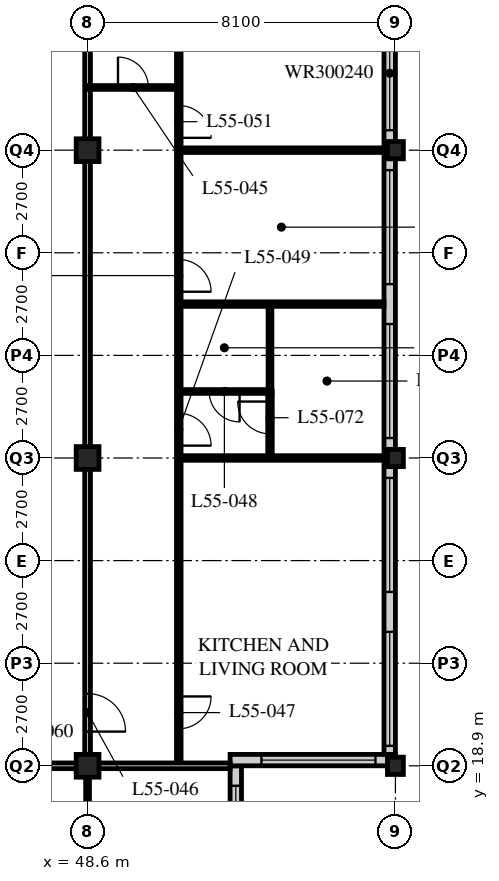
"""IFC4 building model, lengths in metres.
Left out: names, types, materials, properties, quantities, classifications, styles, units other than length and angle.
Written with IfcOpenShell. Run it as: python <this file> out.ifc"""

import sys

from ifc_helpers import new_model, si_unit, direction, frame, frame_2d, origin, origin_2d, place, context, subcontext, project, spatial, rectangle, hollow_rectangle, i_section, extrude, element, fill, save


model = new_model("IFC4")
c1 = context("Model", 3, precision=1e-05, world=origin(), true_north=direction((0.0, 1.0)))
c2 = subcontext(c1, "Body", "Model", "MODEL_VIEW")
j1 = project(units=[si_unit("LENGTHUNIT", "METRE"), si_unit("PLANEANGLEUNIT", "RADIAN")], contexts=[c1])
p1 = place(None, origin())
s1 = spatial("IfcSite", under=j1, at=p1, CompositionType="ELEMENT")
p2 = place(p1, origin())
s2 = spatial("IfcBuilding", under=s1, at=p2, CompositionType="ELEMENT")
p3 = place(p2, frame((0.0, 0.0, 213.6)))
s3 = spatial("IfcBuildingStorey", under=s2, at=p3, CompositionType="ELEMENT", Elevation=213.6)
for number, where, z_axis, x_axis in (
    (1, (48.6, 18.9, 0.0), (0.0, 0.0, 1.0), (1.0, 0.0, 0.0)),
    (2, (48.6, 27.0, 0.0), (0.0, 0.0, 1.0), (1.0, 0.0, 0.0)),
    (3, (48.6, 35.1, 0.0), (0.0, 0.0, 1.0), (1.0, 0.0, 0.0)),
):
    element("IfcColumn", number, at=place(p3, frame(where, z_axis=z_axis, x_axis=x_axis)), inside=s3, PredefinedType="COLUMN", context=c2, shape_type="SweptSolid", body=[
        extrude(hollow_rectangle(XDim=0.6, YDim=0.6, WallThickness=0.05, at=origin_2d()), origin(), (0.0, 0.0, 1.0), 3.6),
    ])
for number, where, z_axis, x_axis in (
    (4, (56.7, 18.9, 0.0), (0.0, 0.0, 1.0), (1.0, 0.0, 0.0)),
    (5, (56.7, 27.0, 0.0), (0.0, 0.0, 1.0), (1.0, 0.0, 0.0)),
    (6, (56.7, 35.1, 0.0), (0.0, 0.0, 1.0), (1.0, 0.0, 0.0)),
):
    element("IfcColumn", number, at=place(p3, frame(where, z_axis=z_axis, x_axis=x_axis)), inside=s3, PredefinedType="COLUMN", context=c2, shape_type="SweptSolid", body=[
        extrude(i_section(OverallWidth=0.418, OverallDepth=0.456, WebThickness=0.042, FlangeThickness=0.067, FilletRadius=0.015, at=origin_2d()), origin(), (0.0, 0.0, 1.0), 3.6),
    ])
p4 = place(p3, frame((52.5, 15.15, 0.0), z_axis=(0.0, 0.0, 1.0), x_axis=(0.0, 1.0, 0.0)))
e7 = element("IfcWall", 7, at=p4, inside=s3, PredefinedType="SOLIDWALL", context=c2, shape_type="SweptSolid", body=[
    extrude(rectangle(XDim=3.75, YDim=0.3, at=frame_2d((1.875, 0.0))), origin(), (0.0, 0.0, 1.0), 3.39),
])
p5 = place(p4, frame((0.225, 0.0, 0.6)))
e8 = element("IfcOpeningElement", 8, at=p5, cuts=e7, PredefinedType="OPENING", context=c2, shape_type="SweptSolid", body=[
    extrude(rectangle(XDim=3.0, YDim=2.0, at=frame_2d((1.5, 1.0))), frame((0.0, 0.16, 0.0), z_axis=(0.0, -1.0, 0.0), x_axis=(1.0, 0.0, 0.0)), (0.0, 0.0, 1.0), 0.32),
])
p6 = place(p3, frame((52.35, 19.05, 0.0), z_axis=(0.0, 0.0, 1.0), x_axis=(1.0, 0.0, 0.0)))
e9 = element("IfcWall", 9, at=p6, inside=s3, PredefinedType="SOLIDWALL", context=c2, shape_type="SweptSolid", body=[
    extrude(rectangle(XDim=4.35, YDim=0.3, at=frame_2d((2.175, 0.0))), origin(), (0.0, 0.0, 1.0), 3.39),
])
p7 = place(p6, frame((0.825, 0.0, 0.6)))
e10 = element("IfcOpeningElement", 10, at=p7, cuts=e9, PredefinedType="OPENING", context=c2, shape_type="SweptSolid", body=[
    extrude(rectangle(XDim=3.0, YDim=2.0, at=frame_2d((1.5, 1.0))), frame((0.0, 0.16, 0.0), z_axis=(0.0, -1.0, 0.0), x_axis=(1.0, 0.0, 0.0)), (0.0, 0.0, 1.0), 0.32),
])
p8 = place(p3, frame((56.55, 19.2, 0.0), z_axis=(0.0, 0.0, 1.0), x_axis=(0.0, 1.0, 0.0)))
e11 = element("IfcWall", 11, at=p8, inside=s3, PredefinedType="SOLIDWALL", context=c2, shape_type="SweptSolid", body=[
    extrude(rectangle(XDim=32.1, YDim=0.3, at=frame_2d((16.05, 0.0))), origin(), (0.0, 0.0, 1.0), 3.39),
])
p9 = place(p8, frame((0.225, 0.0, 0.6)))
e12 = element("IfcOpeningElement", 12, at=p9, cuts=e11, PredefinedType="OPENING", context=c2, shape_type="SweptSolid", body=[
    extrude(rectangle(XDim=3.0, YDim=2.4, at=frame_2d((1.5, 1.2))), frame((0.0, 0.16, 0.0), z_axis=(0.0, -1.0, 0.0), x_axis=(1.0, 0.0, 0.0)), (0.0, 0.0, 1.0), 0.32),
])
p10 = place(p8, frame((4.275, 0.0, 0.6)))
e13 = element("IfcOpeningElement", 13, at=p10, cuts=e11, PredefinedType="OPENING", context=c2, shape_type="SweptSolid", body=[
    extrude(rectangle(XDim=3.0, YDim=2.4, at=frame_2d((1.5, 1.2))), frame((0.0, 0.16, 0.0), z_axis=(0.0, -1.0, 0.0), x_axis=(1.0, 0.0, 0.0)), (0.0, 0.0, 1.0), 0.32),
])
p11 = place(p8, frame((8.325, 0.0, 0.6)))
e14 = element("IfcOpeningElement", 14, at=p11, cuts=e11, PredefinedType="OPENING", context=c2, shape_type="SweptSolid", body=[
    extrude(rectangle(XDim=3.0, YDim=2.4, at=frame_2d((1.5, 1.2))), frame((0.0, 0.16, 0.0), z_axis=(0.0, -1.0, 0.0), x_axis=(1.0, 0.0, 0.0)), (0.0, 0.0, 1.0), 0.32),
])
p12 = place(p8, frame((12.375, 0.0, 0.6)))
e15 = element("IfcOpeningElement", 15, at=p12, cuts=e11, PredefinedType="OPENING", context=c2, shape_type="SweptSolid", body=[
    extrude(rectangle(XDim=3.0, YDim=2.4, at=frame_2d((1.5, 1.2))), frame((0.0, 0.16, 0.0), z_axis=(0.0, -1.0, 0.0), x_axis=(1.0, 0.0, 0.0)), (0.0, 0.0, 1.0), 0.32),
])
p13 = place(p8, frame((16.425, 0.0, 0.6)))
e16 = element("IfcOpeningElement", 16, at=p13, cuts=e11, PredefinedType="OPENING", context=c2, shape_type="SweptSolid", body=[
    extrude(rectangle(XDim=3.0, YDim=2.4, at=frame_2d((1.5, 1.2))), frame((0.0, 0.16, 0.0), z_axis=(0.0, -1.0, 0.0), x_axis=(1.0, 0.0, 0.0)), (0.0, 0.0, 1.0), 0.32),
])
p14 = place(p8, frame((20.475, 0.0, 0.6)))
e17 = element("IfcOpeningElement", 17, at=p14, cuts=e11, PredefinedType="OPENING", context=c2, shape_type="SweptSolid", body=[
    extrude(rectangle(XDim=3.0, YDim=2.4, at=frame_2d((1.5, 1.2))), frame((0.0, 0.16, 0.0), z_axis=(0.0, -1.0, 0.0), x_axis=(1.0, 0.0, 0.0)), (0.0, 0.0, 1.0), 0.32),
])
p15 = place(p8, frame((24.525, 0.0, 0.6)))
e18 = element("IfcOpeningElement", 18, at=p15, cuts=e11, PredefinedType="OPENING", context=c2, shape_type="SweptSolid", body=[
    extrude(rectangle(XDim=3.0, YDim=2.4, at=frame_2d((1.5, 1.2))), frame((0.0, 0.16, 0.0), z_axis=(0.0, -1.0, 0.0), x_axis=(1.0, 0.0, 0.0)), (0.0, 0.0, 1.0), 0.32),
])
p16 = place(p8, frame((28.575, 0.0, 0.6)))
e19 = element("IfcOpeningElement", 19, at=p16, cuts=e11, PredefinedType="OPENING", context=c2, shape_type="SweptSolid", body=[
    extrude(rectangle(XDim=3.0, YDim=2.4, at=frame_2d((1.5, 1.2))), frame((0.0, 0.16, 0.0), z_axis=(0.0, -1.0, 0.0), x_axis=(1.0, 0.0, 0.0)), (0.0, 0.0, 1.0), 0.32),
])
p17 = place(p3, frame((12.15, 18.9, 0.0), z_axis=(0.0, 0.0, 1.0), x_axis=(1.0, 0.0, 0.0)))
e20 = element("IfcWall", 20, at=p17, inside=s3, PredefinedType="PARTITIONING", context=c2, shape_type="SweptSolid", body=[
    extrude(rectangle(XDim=36.45, YDim=0.15, at=frame_2d((18.225, 0.0))), origin(), (0.0, 0.0, 1.0), 2.778),
])
p18 = place(p17, frame((4.95, 0.0, 0.0)))
e21 = element("IfcOpeningElement", 21, at=p18, cuts=e20, PredefinedType="OPENING", context=c2, shape_type="SweptSolid", body=[
    extrude(rectangle(XDim=1.0, YDim=2.1, at=frame_2d((0.5, 1.05))), frame((0.0, 0.085, 0.0), z_axis=(0.0, -1.0, 0.0), x_axis=(1.0, 0.0, 0.0)), (0.0, 0.0, 1.0), 0.17),
])
p19 = place(p17, frame((22.6, 0.0, 0.0)))
e22 = element("IfcOpeningElement", 22, at=p19, cuts=e20, PredefinedType="OPENING", context=c2, shape_type="SweptSolid", body=[
    extrude(rectangle(XDim=1.0, YDim=2.1, at=frame_2d((0.5, 1.05))), frame((0.0, 0.085, 0.0), z_axis=(0.0, -1.0, 0.0), x_axis=(1.0, 0.0, 0.0)), (0.0, 0.0, 1.0), 0.17),
])
p20 = place(p17, frame((25.0, 0.0, 0.0)))
e23 = element("IfcOpeningElement", 23, at=p20, cuts=e20, PredefinedType="OPENING", context=c2, shape_type="SweptSolid", body=[
    extrude(rectangle(XDim=1.0, YDim=2.1, at=frame_2d((0.5, 1.05))), frame((0.0, 0.085, 0.0), z_axis=(0.0, -1.0, 0.0), x_axis=(1.0, 0.0, 0.0)), (0.0, 0.0, 1.0), 0.17),
])
p21 = place(p17, frame((30.7, 0.0, 0.0)))
e24 = element("IfcOpeningElement", 24, at=p21, cuts=e20, PredefinedType="OPENING", context=c2, shape_type="SweptSolid", body=[
    extrude(rectangle(XDim=1.0, YDim=2.1, at=frame_2d((0.5, 1.05))), frame((0.0, 0.085, 0.0), z_axis=(0.0, -1.0, 0.0), x_axis=(1.0, 0.0, 0.0)), (0.0, 0.0, 1.0), 0.17),
])
p22 = place(p17, frame((1.525, 0.0, 0.0)))
e25 = element("IfcOpeningElement", 25, at=p22, cuts=e20, PredefinedType="OPENING", context=c2, shape_type="SweptSolid", body=[
    extrude(rectangle(XDim=1.0, YDim=2.1, at=frame_2d((0.5, 1.05))), frame((0.0, 0.085, 0.0), z_axis=(0.0, -1.0, 0.0), x_axis=(1.0, 0.0, 0.0)), (0.0, 0.0, 1.0), 0.17),
])
p23 = place(p17, frame((32.825, 0.0, 0.0)))
e26 = element("IfcOpeningElement", 26, at=p23, cuts=e20, PredefinedType="OPENING", context=c2, shape_type="SweptSolid", body=[
    extrude(rectangle(XDim=1.0, YDim=2.1, at=frame_2d((0.5, 1.05))), frame((0.0, 0.085, 0.0), z_axis=(0.0, -1.0, 0.0), x_axis=(1.0, 0.0, 0.0)), (0.0, 0.0, 1.0), 0.17),
])
p24 = place(p3, frame((48.6, 18.9, 0.0), z_axis=(0.0, 0.0, 1.0), x_axis=(0.0, 1.0, 0.0)))
e27 = element("IfcWall", 27, at=p24, inside=s3, PredefinedType="PARTITIONING", context=c2, shape_type="SweptSolid", body=[
    extrude(rectangle(XDim=24.3, YDim=0.15, at=frame_2d((12.15, 0.0))), origin(), (0.0, 0.0, 1.0), 2.778),
])
p25 = place(p24, frame((0.9, 0.0, 0.0)))
e28 = element("IfcOpeningElement", 28, at=p25, cuts=e27, PredefinedType="OPENING", context=c2, shape_type="SweptSolid", body=[
    extrude(rectangle(XDim=1.0, YDim=2.1, at=frame_2d((0.5, 1.05))), frame((0.0, 0.085, 0.0), z_axis=(0.0, -1.0, 0.0), x_axis=(1.0, 0.0, 0.0)), (0.0, 0.0, 1.0), 0.17),
])
p26 = place(p24, frame((20.95, 0.0, 0.0)))
e29 = element("IfcOpeningElement", 29, at=p26, cuts=e27, PredefinedType="OPENING", context=c2, shape_type="SweptSolid", body=[
    extrude(rectangle(XDim=1.0, YDim=2.1, at=frame_2d((0.5, 1.05))), frame((0.0, 0.085, 0.0), z_axis=(0.0, -1.0, 0.0), x_axis=(1.0, 0.0, 0.0)), (0.0, 0.0, 1.0), 0.17),
])
p27 = place(p3, frame((51.0, 18.9, 0.0), z_axis=(0.0, 0.0, 1.0), x_axis=(0.0, 1.0, 0.0)))
e30 = element("IfcWall", 30, at=p27, inside=s3, PredefinedType="PARTITIONING", context=c2, shape_type="SweptSolid", body=[
    extrude(rectangle(XDim=20.25, YDim=0.12, at=frame_2d((10.125, 0.0))), origin(), (0.0, 0.0, 1.0), 3.39),
])
p28 = place(p27, frame((0.975, 0.0, 0.0)))
e31 = element("IfcOpeningElement", 31, at=p28, cuts=e30, PredefinedType="OPENING", context=c2, shape_type="SweptSolid", body=[
    extrude(rectangle(XDim=0.85, YDim=2.1, at=frame_2d((0.425, 1.05))), frame((0.0, 0.07, 0.0), z_axis=(0.0, -1.0, 0.0), x_axis=(1.0, 0.0, 0.0)), (0.0, 0.0, 1.0), 0.14),
])
p29 = place(p27, frame((8.425, 0.0, 0.0)))
e32 = element("IfcOpeningElement", 32, at=p29, cuts=e30, PredefinedType="OPENING", context=c2, shape_type="SweptSolid", body=[
    extrude(rectangle(XDim=0.85, YDim=2.1, at=frame_2d((0.425, 1.05))), frame((0.0, 0.07, 0.0), z_axis=(0.0, -1.0, 0.0), x_axis=(1.0, 0.0, 0.0)), (0.0, 0.0, 1.0), 0.14),
])
p30 = place(p27, frame((12.475, 0.0, 0.0)))
e33 = element("IfcOpeningElement", 33, at=p30, cuts=e30, PredefinedType="OPENING", context=c2, shape_type="SweptSolid", body=[
    extrude(rectangle(XDim=0.85, YDim=2.1, at=frame_2d((0.425, 1.05))), frame((0.0, 0.07, 0.0), z_axis=(0.0, -1.0, 0.0), x_axis=(1.0, 0.0, 0.0)), (0.0, 0.0, 1.0), 0.14),
])
p31 = place(p27, frame((16.525, 0.0, 0.0)))
e34 = element("IfcOpeningElement", 34, at=p31, cuts=e30, PredefinedType="OPENING", context=c2, shape_type="SweptSolid", body=[
    extrude(rectangle(XDim=0.85, YDim=2.1, at=frame_2d((0.425, 1.05))), frame((0.0, 0.07, 0.0), z_axis=(0.0, -1.0, 0.0), x_axis=(1.0, 0.0, 0.0)), (0.0, 0.0, 1.0), 0.14),
])
p32 = place(p3, frame((48.6, 36.75, 0.0), z_axis=(0.0, 0.0, 1.0), x_axis=(1.0, 0.0, 0.0)))
e35 = element("IfcWall", 35, at=p32, inside=s3, PredefinedType="PARTITIONING", context=c2, shape_type="SweptSolid", body=[
    extrude(rectangle(XDim=2.4, YDim=0.1, at=frame_2d((1.2, 0.0))), origin(), (0.0, 0.0, 1.0), 3.39),
])
p33 = place(p32, frame((0.8, 0.0, 0.0)))
e36 = element("IfcOpeningElement", 36, at=p33, cuts=e35, PredefinedType="OPENING", context=c2, shape_type="SweptSolid", body=[
    extrude(rectangle(XDim=0.8, YDim=2.1, at=frame_2d((0.4, 1.05))), frame((0.0, 0.06, 0.0), z_axis=(0.0, -1.0, 0.0), x_axis=(1.0, 0.0, 0.0)), (0.0, 0.0, 1.0), 0.12),
])
p34 = place(p3, frame((51.0, 28.75, 0.0), z_axis=(0.0, 0.0, 1.0), x_axis=(1.0, 0.0, 0.0)))
e37 = element("IfcWall", 37, at=p34, inside=s3, PredefinedType="PARTITIONING", context=c2, shape_type="SweptSolid", body=[
    extrude(rectangle(XDim=2.4, YDim=0.1, at=frame_2d((1.2, 0.0))), origin(), (0.0, 0.0, 1.0), 3.39),
])
p35 = place(p34, frame((0.8, 0.0, 0.0)))
e38 = element("IfcOpeningElement", 38, at=p35, cuts=e37, PredefinedType="OPENING", context=c2, shape_type="SweptSolid", body=[
    extrude(rectangle(XDim=0.8, YDim=2.1, at=frame_2d((0.4, 1.05))), frame((0.0, 0.06, 0.0), z_axis=(0.0, -1.0, 0.0), x_axis=(1.0, 0.0, 0.0)), (0.0, 0.0, 1.0), 0.12),
])
p36 = place(p3, frame((53.4, 28.75, 0.0), z_axis=(0.0, 0.0, 1.0), x_axis=(0.0, 1.0, 0.0)))
e39 = element("IfcWall", 39, at=p36, inside=s3, PredefinedType="PARTITIONING", context=c2, shape_type="SweptSolid", body=[
    extrude(rectangle(XDim=2.3, YDim=0.1, at=frame_2d((1.15, 0.0))), origin(), (0.0, 0.0, 1.0), 3.39),
])
p37 = place(p3, frame((51.0, 27.0, 0.0), z_axis=(0.0, 0.0, 1.0), x_axis=(1.0, 0.0, 0.0)))
e40 = element("IfcWall", 40, at=p37, inside=s3, PredefinedType="PARTITIONING", context=c2, shape_type="SweptSolid", body=[
    extrude(rectangle(XDim=5.4, YDim=0.12, at=frame_2d((2.7, 0.0))), origin(), (0.0, 0.0, 1.0), 2.778),
])
p38 = place(p3, frame((51.0, 31.05, 0.0), z_axis=(0.0, 0.0, 1.0), x_axis=(1.0, 0.0, 0.0)))
e41 = element("IfcWall", 41, at=p38, inside=s3, PredefinedType="PARTITIONING", context=c2, shape_type="SweptSolid", body=[
    extrude(rectangle(XDim=5.4, YDim=0.12, at=frame_2d((2.7, 0.0))), origin(), (0.0, 0.0, 1.0), 3.39),
])
p39 = place(p3, frame((51.0, 35.1, 0.0), z_axis=(0.0, 0.0, 1.0), x_axis=(1.0, 0.0, 0.0)))
e42 = element("IfcWall", 42, at=p39, inside=s3, PredefinedType="PARTITIONING", context=c2, shape_type="SweptSolid", body=[
    extrude(rectangle(XDim=5.4, YDim=0.12, at=frame_2d((2.7, 0.0))), origin(), (0.0, 0.0, 1.0), 2.778),
])
p40 = place(p3, frame((48.6, 18.9, 0.0), z_axis=(0.0, 0.0, 1.0), x_axis=(0.0, -1.0, 0.0)))
e43 = element("IfcWall", 43, at=p40, inside=s3, PredefinedType="PARTITIONING", context=c2, shape_type="SweptSolid", body=[
    extrude(rectangle(XDim=2.4, YDim=0.1, at=frame_2d((1.2, 0.0))), origin(), (0.0, 0.0, 1.0), 2.778),
])
p41 = place(p3, frame((48.6, 18.9, 0.0), z_axis=(0.0, 0.0, 1.0), x_axis=(1.0, 0.0, 0.0)))
e44 = element("IfcWall", 44, at=p41, inside=s3, PredefinedType="PARTITIONING", context=c2, shape_type="SweptSolid", body=[
    extrude(rectangle(XDim=3.75, YDim=0.15, at=frame_2d((1.875, 0.0))), origin(), (0.0, 0.0, 1.0), 2.778),
])
p42 = place(p3, frame((53.4, 28.76, 0.0), z_axis=(0.0, 0.0, 1.0), x_axis=(0.0, -1.0, 0.0)))
e45 = element("IfcWall", 45, at=p42, inside=s3, PredefinedType="PARTITIONING", context=c2, shape_type="SweptSolid", body=[
    extrude(rectangle(XDim=1.76, YDim=0.12, at=frame_2d((0.88, 0.0))), origin(), (0.0, 0.0, 1.0), 3.39),
])
p43 = place(p42, frame((0.275, 0.0, 0.0)))
e46 = element("IfcOpeningElement", 46, at=p43, cuts=e45, PredefinedType="OPENING", context=c2, shape_type="SweptSolid", body=[
    extrude(rectangle(XDim=0.85, YDim=2.1, at=frame_2d((0.425, 1.05))), frame((0.0, 0.07, 0.0), z_axis=(0.0, -1.0, 0.0), x_axis=(1.0, 0.0, 0.0)), (0.0, 0.0, 1.0), 0.14),
])
p44 = place(p5, origin())
e47 = element("IfcWindow", 47, at=p44, inside=s3, PartitioningType="SINGLE_PANEL", PredefinedType="WINDOW", context=c2, shape_type="SweptSolid", body=[
    extrude(rectangle(XDim=3.0, YDim=2.0, at=frame_2d((1.5, 1.0))), frame((0.0, 0.03, 0.0), z_axis=(0.0, -1.0, 0.0), x_axis=(1.0, 0.0, 0.0)), (0.0, 0.0, 1.0), 0.06),
])
fill(e8, e47)
p45 = place(p7, origin())
e48 = element("IfcWindow", 48, at=p45, inside=s3, PartitioningType="SINGLE_PANEL", PredefinedType="WINDOW", context=c2, shape_type="SweptSolid", body=[
    extrude(rectangle(XDim=3.0, YDim=2.0, at=frame_2d((1.5, 1.0))), frame((0.0, 0.03, 0.0), z_axis=(0.0, -1.0, 0.0), x_axis=(1.0, 0.0, 0.0)), (0.0, 0.0, 1.0), 0.06),
])
fill(e10, e48)
p46 = place(p9, origin())
e49 = element("IfcWindow", 49, at=p46, inside=s3, PartitioningType="SINGLE_PANEL", PredefinedType="WINDOW", context=c2, shape_type="SweptSolid", body=[
    extrude(rectangle(XDim=3.0, YDim=2.4, at=frame_2d((1.5, 1.2))), frame((0.0, 0.03, 0.0), z_axis=(0.0, -1.0, 0.0), x_axis=(1.0, 0.0, 0.0)), (0.0, 0.0, 1.0), 0.06),
])
fill(e12, e49)
p47 = place(p10, origin())
e50 = element("IfcWindow", 50, at=p47, inside=s3, PartitioningType="SINGLE_PANEL", PredefinedType="WINDOW", context=c2, shape_type="SweptSolid", body=[
    extrude(rectangle(XDim=3.0, YDim=2.4, at=frame_2d((1.5, 1.2))), frame((0.0, 0.03, 0.0), z_axis=(0.0, -1.0, 0.0), x_axis=(1.0, 0.0, 0.0)), (0.0, 0.0, 1.0), 0.06),
])
fill(e13, e50)
p48 = place(p11, origin())
e51 = element("IfcWindow", 51, at=p48, inside=s3, PartitioningType="SINGLE_PANEL", PredefinedType="WINDOW", context=c2, shape_type="SweptSolid", body=[
    extrude(rectangle(XDim=3.0, YDim=2.4, at=frame_2d((1.5, 1.2))), frame((0.0, 0.03, 0.0), z_axis=(0.0, -1.0, 0.0), x_axis=(1.0, 0.0, 0.0)), (0.0, 0.0, 1.0), 0.06),
])
fill(e14, e51)
p49 = place(p12, origin())
e52 = element("IfcWindow", 52, at=p49, inside=s3, PartitioningType="SINGLE_PANEL", PredefinedType="WINDOW", context=c2, shape_type="SweptSolid", body=[
    extrude(rectangle(XDim=3.0, YDim=2.4, at=frame_2d((1.5, 1.2))), frame((0.0, 0.03, 0.0), z_axis=(0.0, -1.0, 0.0), x_axis=(1.0, 0.0, 0.0)), (0.0, 0.0, 1.0), 0.06),
])
fill(e15, e52)
p50 = place(p13, origin())
e53 = element("IfcWindow", 53, at=p50, inside=s3, PartitioningType="SINGLE_PANEL", PredefinedType="WINDOW", context=c2, shape_type="SweptSolid", body=[
    extrude(rectangle(XDim=3.0, YDim=2.4, at=frame_2d((1.5, 1.2))), frame((0.0, 0.03, 0.0), z_axis=(0.0, -1.0, 0.0), x_axis=(1.0, 0.0, 0.0)), (0.0, 0.0, 1.0), 0.06),
])
fill(e16, e53)
p51 = place(p33, origin())
e54 = element("IfcDoor", 54, at=p51, inside=s3, OperationType="SINGLE_SWING_LEFT", PredefinedType="DOOR", context=c2, shape_type="SweptSolid", body=[
    extrude(rectangle(XDim=0.8, YDim=2.1, at=frame_2d((0.4, 1.05))), frame((0.0, 0.025, 0.0), z_axis=(0.0, -1.0, 0.0), x_axis=(1.0, 0.0, 0.0)), (0.0, 0.0, 1.0), 0.05),
])
fill(e36, e54)
p52 = place(p25, origin())
e55 = element("IfcDoor", 55, at=p52, inside=s3, OperationType="SINGLE_SWING_RIGHT", PredefinedType="DOOR", context=c2, shape_type="SweptSolid", body=[
    extrude(rectangle(XDim=1.0, YDim=2.1, at=frame_2d((0.5, 1.05))), frame((0.0, 0.025, 0.0), z_axis=(0.0, -1.0, 0.0), x_axis=(1.0, 0.0, 0.0)), (0.0, 0.0, 1.0), 0.05),
])
fill(e28, e55)
p53 = place(p28, origin())
e56 = element("IfcDoor", 56, at=p53, inside=s3, OperationType="SINGLE_SWING_LEFT", PredefinedType="DOOR", context=c2, shape_type="SweptSolid", body=[
    extrude(rectangle(XDim=0.85, YDim=2.1, at=frame_2d((0.425, 1.05))), frame((0.0, 0.025, 0.0), z_axis=(0.0, -1.0, 0.0), x_axis=(1.0, 0.0, 0.0)), (0.0, 0.0, 1.0), 0.05),
])
fill(e31, e56)
p54 = place(p35, origin())
e57 = element("IfcDoor", 57, at=p54, inside=s3, OperationType="SINGLE_SWING_LEFT", PredefinedType="DOOR", context=c2, shape_type="SweptSolid", body=[
    extrude(rectangle(XDim=0.8, YDim=2.1, at=frame_2d((0.4, 1.05))), frame((0.0, 0.025, 0.0), z_axis=(0.0, -1.0, 0.0), x_axis=(1.0, 0.0, 0.0)), (0.0, 0.0, 1.0), 0.05),
])
fill(e38, e57)
p55 = place(p29, origin())
e58 = element("IfcDoor", 58, at=p55, inside=s3, OperationType="SINGLE_SWING_RIGHT", PredefinedType="DOOR", context=c2, shape_type="SweptSolid", body=[
    extrude(rectangle(XDim=0.85, YDim=2.1, at=frame_2d((0.425, 1.05))), frame((0.0, 0.025, 0.0), z_axis=(0.0, -1.0, 0.0), x_axis=(1.0, 0.0, 0.0)), (0.0, 0.0, 1.0), 0.05),
])
fill(e32, e58)
p56 = place(p30, origin())
e59 = element("IfcDoor", 59, at=p56, inside=s3, OperationType="SINGLE_SWING_RIGHT", PredefinedType="DOOR", context=c2, shape_type="SweptSolid", body=[
    extrude(rectangle(XDim=0.85, YDim=2.1, at=frame_2d((0.425, 1.05))), frame((0.0, 0.025, 0.0), z_axis=(0.0, -1.0, 0.0), x_axis=(1.0, 0.0, 0.0)), (0.0, 0.0, 1.0), 0.05),
])
fill(e33, e59)
p57 = place(p31, origin())
e60 = element("IfcDoor", 60, at=p57, inside=s3, OperationType="SINGLE_SWING_RIGHT", PredefinedType="DOOR", context=c2, shape_type="SweptSolid", body=[
    extrude(rectangle(XDim=0.85, YDim=2.1, at=frame_2d((0.425, 1.05))), frame((0.0, 0.025, 0.0), z_axis=(0.0, -1.0, 0.0), x_axis=(1.0, 0.0, 0.0)), (0.0, 0.0, 1.0), 0.05),
])
fill(e34, e60)
p58 = place(p43, origin())
e61 = element("IfcDoor", 61, at=p58, inside=s3, OperationType="SINGLE_SWING_RIGHT", PredefinedType="DOOR", context=c2, shape_type="SweptSolid", body=[
    extrude(rectangle(XDim=0.85, YDim=2.1, at=frame_2d((0.425, 1.05))), frame((0.0, 0.025, 0.0), z_axis=(0.0, -1.0, 0.0), x_axis=(1.0, 0.0, 0.0)), (0.0, 0.0, 1.0), 0.05),
])
fill(e46, e61)
save(model, sys.argv[1])
